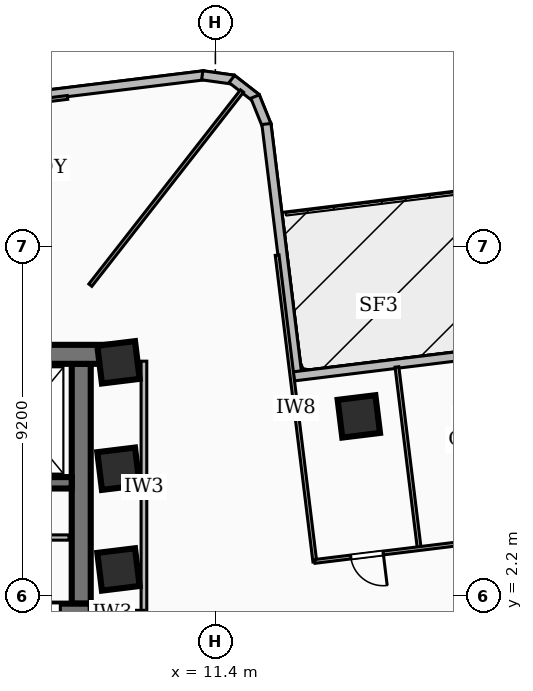
"""IFC4 building model, lengths in metres.
Left out: names, types, materials, properties, quantities, classifications, styles, units other than length and angle.
Written with IfcOpenShell. Run it as: python <this file> out.ifc"""

import sys

from ifc_helpers import new_model, si_unit, direction, frame, frame_2d, origin, origin_2d, place, context, subcontext, project, spatial, rectangle, extrude, element, fill, save


model = new_model("IFC4")
c1 = context("Model", 3, precision=1e-05, world=origin(), true_north=direction((0.0, 1.0)))
c2 = subcontext(c1, "Body", "Model", "MODEL_VIEW")
j1 = project(units=[si_unit("LENGTHUNIT", "METRE"), si_unit("PLANEANGLEUNIT", "RADIAN")], contexts=[c1])
p1 = place(None, origin())
s1 = spatial("IfcSite", under=j1, at=p1, CompositionType="ELEMENT")
p2 = place(p1, origin())
s2 = spatial("IfcBuilding", under=s1, at=p2, CompositionType="ELEMENT")
p3 = place(p2, frame((0.0, 0.0, 78.48)))
s3 = spatial("IfcBuildingStorey", under=s2, at=p3, CompositionType="ELEMENT", Elevation=78.48)
p4 = place(p3, frame((-8.78, 8.56, 0.0), z_axis=(0.0, 0.0, 1.0), x_axis=(1.0, 0.0, 0.0)))
e1 = element("IfcWall", 1, at=p4, inside=s3, PredefinedType="SHEAR", context=c2, shape_type="SweptSolid", body=[
    extrude(rectangle(XDim=17.56, YDim=0.5, at=frame_2d((8.78, 0.0))), origin(), (0.0, 0.0, 1.0), 3.34),
])
p5 = place(p3, frame((8.12, 1.75, 0.0), z_axis=(0.0, 0.0, 1.0), x_axis=(-1.0, 0.0, 0.0)))
e2 = element("IfcWall", 2, at=p5, inside=s3, PredefinedType="SHEAR", context=c2, shape_type="SweptSolid", body=[
    extrude(rectangle(XDim=16.24, YDim=0.5, at=frame_2d((8.12, 0.0))), origin(), (0.0, 0.0, 1.0), 3.34),
])
p6 = place(p5, frame((7.45, 0.0, 0.0)))
e3 = element("IfcOpeningElement", 3, at=p6, cuts=e2, PredefinedType="OPENING", context=c2, shape_type="SweptSolid", body=[
    extrude(rectangle(XDim=1.0, YDim=2.1, at=frame_2d((0.5, 1.05))), frame((0.0, 0.26, 0.0), z_axis=(0.0, -1.0, 0.0), x_axis=(1.0, 0.0, 0.0)), (0.0, 0.0, 1.0), 0.52),
])
p7 = place(p5, frame((3.85, 0.0, 0.0)))
e4 = element("IfcOpeningElement", 4, at=p7, cuts=e2, PredefinedType="OPENING", context=c2, shape_type="SweptSolid", body=[
    extrude(rectangle(XDim=0.9, YDim=2.06, at=frame_2d((0.45, 1.03))), frame((0.0, 0.26, 0.0), z_axis=(0.0, -1.0, 0.0), x_axis=(1.0, 0.0, 0.0)), (0.0, 0.0, 1.0), 0.52),
])
p8 = place(p5, frame((2.35, 0.0, 0.0)))
e5 = element("IfcOpeningElement", 5, at=p8, cuts=e2, PredefinedType="OPENING", context=c2, shape_type="SweptSolid", body=[
    extrude(rectangle(XDim=0.9, YDim=2.06, at=frame_2d((0.45, 1.03))), frame((0.0, 0.26, 0.0), z_axis=(0.0, -1.0, 0.0), x_axis=(1.0, 0.0, 0.0)), (0.0, 0.0, 1.0), 0.52),
])
p9 = place(p5, frame((0.8, 0.0, 0.0)))
e6 = element("IfcOpeningElement", 6, at=p9, cuts=e2, PredefinedType="OPENING", context=c2, shape_type="SweptSolid", body=[
    extrude(rectangle(XDim=0.9, YDim=2.06, at=frame_2d((0.45, 1.03))), frame((0.0, 0.26, 0.0), z_axis=(0.0, -1.0, 0.0), x_axis=(1.0, 0.0, 0.0)), (0.0, 0.0, 1.0), 0.52),
])
p10 = place(p3, frame((7.87, 8.31, 0.0), z_axis=(0.0, 0.0, 1.0), x_axis=(0.0, -1.0, 0.0)))
e7 = element("IfcWall", 7, at=p10, inside=s3, PredefinedType="SHEAR", context=c2, shape_type="SweptSolid", body=[
    extrude(rectangle(XDim=6.31, YDim=0.5, at=frame_2d((3.155, 0.0))), origin(), (0.0, 0.0, 1.0), 3.34),
])
p11 = place(p3, frame((7.62, 5.18, 0.0), z_axis=(0.0, 0.0, 1.0), x_axis=(-1.0, 0.0, 0.0)))
e8 = element("IfcWall", 8, at=p11, inside=s3, PredefinedType="SOLIDWALL", context=c2, shape_type="SweptSolid", body=[
    extrude(rectangle(XDim=15.24, YDim=0.3, at=frame_2d((7.62, 0.0))), origin(), (0.0, 0.0, 1.0), 3.34),
])
p12 = place(p11, frame((5.77, 0.0, 0.0)))
e9 = element("IfcOpeningElement", 9, at=p12, cuts=e8, PredefinedType="OPENING", context=c2, shape_type="SweptSolid", body=[
    extrude(rectangle(XDim=1.1, YDim=2.15, at=frame_2d((0.55, 1.075))), frame((0.0, 0.16, 0.0), z_axis=(0.0, -1.0, 0.0), x_axis=(1.0, 0.0, 0.0)), (0.0, 0.0, 1.0), 0.32),
])
p13 = place(p11, frame((2.97, 0.0, 0.0)))
e10 = element("IfcOpeningElement", 10, at=p13, cuts=e8, PredefinedType="OPENING", context=c2, shape_type="SweptSolid", body=[
    extrude(rectangle(XDim=1.1, YDim=2.15, at=frame_2d((0.55, 1.075))), frame((0.0, 0.16, 0.0), z_axis=(0.0, -1.0, 0.0), x_axis=(1.0, 0.0, 0.0)), (0.0, 0.0, 1.0), 0.32),
])
p14 = place(p11, frame((7.97, 0.0, 0.0)))
e11 = element("IfcOpeningElement", 11, at=p14, cuts=e8, PredefinedType="OPENING", context=c2, shape_type="SweptSolid", body=[
    extrude(rectangle(XDim=1.0, YDim=2.1, at=frame_2d((0.5, 1.05))), frame((0.0, 0.16, 0.0), z_axis=(0.0, -1.0, 0.0), x_axis=(1.0, 0.0, 0.0)), (0.0, 0.0, 1.0), 0.32),
])
for number, where, z_axis, x_axis in (
    (12, (8.85, 2.9, 0.0), (0.0, 0.0, 1.0), (0.993, 0.122, 0.0)),
    (13, (8.85, 5.55, 0.0), (0.0, 0.0, 1.0), (0.993, 0.122, 0.0)),
    (14, (8.85, 8.35, 0.0), (0.0, 0.0, 1.0), (0.993, 0.122, 0.0)),
    (15, (15.175, 6.927, 0.0), (0.0, 0.0, 1.0), (0.993, 0.122, 0.0)),
):
    element("IfcColumn", number, at=place(p3, frame(where, z_axis=z_axis, x_axis=x_axis)), inside=s3, PredefinedType="COLUMN", context=c2, shape_type="SweptSolid", body=[
        extrude(rectangle(XDim=1.0, YDim=1.0, at=origin_2d()), origin(), (0.0, 0.0, 1.0), 3.6),
    ])
p15 = place(p3, frame((4.558, 15.098, 0.0), z_axis=(0.0, 0.0, 1.0), x_axis=(0.992537639855, 0.121938646341, 0.0)))
e16 = element("IfcWall", 16, at=p15, inside=s3, PredefinedType="SOLIDWALL", context=c2, shape_type="SweptSolid", body=[
    extrude(rectangle(XDim=6.595, YDim=0.24, at=frame_2d((3.298, 0.0))), origin(), (0.0, 0.0, 1.0), 2.486),
])
p16 = place(p3, frame((11.054, 15.902, 0.0), z_axis=(0.0, 0.0, 1.0), x_axis=(0.990379629694, -0.138376981782, 0.0)))
e17 = element("IfcWall", 17, at=p16, inside=s3, PredefinedType="SOLIDWALL", context=c2, shape_type="SweptSolid", body=[
    extrude(rectangle(XDim=0.831, YDim=0.24, at=frame_2d((0.416, 0.0))), origin(), (0.0, 0.0, 1.0), 3.34),
])
p17 = place(p3, frame((11.832, 15.805, 0.0), z_axis=(0.0, 0.0, 1.0), x_axis=(0.788996702001, -0.614397431824, 0.0)))
e18 = element("IfcWall", 18, at=p17, inside=s3, PredefinedType="SOLIDWALL", context=c2, shape_type="SweptSolid", body=[
    extrude(rectangle(XDim=0.814, YDim=0.24, at=frame_2d((0.407, 0.0))), origin(), (0.0, 0.0, 1.0), 3.34),
])
p18 = place(p3, frame((12.445, 15.343, 0.0), z_axis=(0.0, 0.0, 1.0), x_axis=(0.37326634174, -0.927724225254, 0.0)))
e19 = element("IfcWall", 19, at=p18, inside=s3, PredefinedType="SOLIDWALL", context=c2, shape_type="SweptSolid", body=[
    extrude(rectangle(XDim=0.83, YDim=0.24, at=frame_2d((0.415, 0.0))), origin(), (0.0, 0.0, 1.0), 3.34),
])
p19 = place(p3, frame((12.743, 14.621, 0.0), z_axis=(0.0, 0.0, 1.0), x_axis=(0.121949848087, -0.992536263595, 0.0)))
e20 = element("IfcWall", 20, at=p19, inside=s3, PredefinedType="SOLIDWALL", context=c2, shape_type="SweptSolid", body=[
    extrude(rectangle(XDim=6.775, YDim=0.24, at=frame_2d((3.387, 0.0))), origin(), (0.0, 0.0, 1.0), 2.644),
])
p20 = place(p3, frame((13.462, 7.98, 0.0), z_axis=(0.0, 0.0, 1.0), x_axis=(0.992550299081, 0.121835560463, 0.0)))
e21 = element("IfcWall", 21, at=p20, inside=s3, PredefinedType="SOLIDWALL", context=c2, shape_type="SweptSolid", body=[
    extrude(rectangle(XDim=16.275, YDim=0.24, at=frame_2d((8.138, 0.0))), origin(), (0.0, 0.0, 1.0), 2.644),
])
p21 = place(p20, frame((4.4, 0.0, 0.0)))
e22 = element("IfcOpeningElement", 22, at=p21, cuts=e21, PredefinedType="OPENING", context=c2, shape_type="SweptSolid", body=[
    extrude(rectangle(XDim=1.1, YDim=2.1, at=frame_2d((0.55, 1.05))), frame((0.0, 0.13, 0.0), z_axis=(0.0, -1.0, 0.0), x_axis=(1.0, 0.0, 0.0)), (0.0, 0.0, 1.0), 0.26),
])
p22 = place(p3, frame((2.9, 3.74, 0.0), z_axis=(0.0, 0.0, 1.0), x_axis=(1.0, 0.0, 0.0)))
e23 = element("IfcWall", 23, at=p22, inside=s3, PredefinedType="PARTITIONING", context=c2, shape_type="SweptSolid", body=[
    extrude(rectangle(XDim=4.65, YDim=0.138, at=frame_2d((2.325, 0.0))), origin(), (0.0, 0.0, 1.0), 3.34),
])
p23 = place(p3, frame((9.52, 1.75, 0.0), z_axis=(0.0, 0.0, 1.0), x_axis=(0.0, 1.0, 0.0)))
e24 = element("IfcWall", 24, at=p23, inside=s3, PredefinedType="PARTITIONING", context=c2, shape_type="SweptSolid", body=[
    extrude(rectangle(XDim=6.63, YDim=0.15, at=frame_2d((3.315, 0.0))), origin(), (0.0, 0.0, 1.0), 2.486),
])
p24 = place(p3, frame((7.85, 1.75, 0.0), z_axis=(0.0, 0.0, 1.0), x_axis=(1.0, 0.0, 0.0)))
e25 = element("IfcWall", 25, at=p24, inside=s3, PredefinedType="PARTITIONING", context=c2, shape_type="SweptSolid", body=[
    extrude(rectangle(XDim=1.67, YDim=0.15, at=frame_2d((0.835, 0.0))), origin(), (0.0, 0.0, 1.0), 2.405),
])
p25 = place(p3, frame((8.11, 10.38, 0.0), z_axis=(0.0, 0.0, 1.0), x_axis=(0.615665236773, 0.788007814828, 0.0)))
e26 = element("IfcWall", 26, at=p25, inside=s3, PredefinedType="PARTITIONING", context=c2, shape_type="SweptSolid", body=[
    extrude(rectangle(XDim=6.482, YDim=0.1, at=frame_2d((3.241, 0.0))), origin(), (0.0, 0.0, 1.0), 2.644),
])
p26 = place(p3, frame((14.017, 3.101, 0.0), z_axis=(0.0, 0.0, 1.0), x_axis=(-0.122045971517, 0.992524448483, 0.0)))
e27 = element("IfcWall", 27, at=p26, inside=s3, PredefinedType="PARTITIONING", context=c2, shape_type="SweptSolid", body=[
    extrude(rectangle(XDim=8.13, YDim=0.1, at=frame_2d((4.065, 0.0))), origin(), (0.0, 0.0, 1.0), 2.486),
])
p27 = place(p3, frame((16.762, 3.469, 0.0), z_axis=(0.0, 0.0, 1.0), x_axis=(-0.121797137196, 0.992555014783, 0.0)))
e28 = element("IfcWall", 28, at=p27, inside=s3, PredefinedType="PARTITIONING", context=c2, shape_type="SweptSolid", body=[
    extrude(rectangle(XDim=4.795, YDim=0.1, at=frame_2d((2.397, 0.0))), origin(), (0.0, 0.0, 1.0), 2.486),
])
p28 = place(p3, frame((21.866, 4.075, 0.0), z_axis=(0.0, 0.0, 1.0), x_axis=(-0.992548040298, -0.121853960542, 0.0)))
e29 = element("IfcWall", 29, at=p28, inside=s3, PredefinedType="PARTITIONING", context=c2, shape_type="SweptSolid", body=[
    extrude(rectangle(XDim=7.91, YDim=0.1, at=frame_2d((3.955, 0.0))), origin(), (0.0, 0.0, 1.0), 3.34),
])
p29 = place(p28, frame((6.095, 0.0, 0.0)))
e30 = element("IfcOpeningElement", 30, at=p29, cuts=e29, PredefinedType="OPENING", context=c2, shape_type="SweptSolid", body=[
    extrude(rectangle(XDim=0.86, YDim=2.04, at=frame_2d((0.43, 1.02))), frame((0.0, 0.06, 0.0), z_axis=(0.0, -1.0, 0.0), x_axis=(1.0, 0.0, 0.0)), (0.0, 0.0, 1.0), 0.12),
])
p30 = place(p28, frame((2.14, 0.0, 0.0)))
e31 = element("IfcOpeningElement", 31, at=p30, cuts=e29, PredefinedType="OPENING", context=c2, shape_type="SweptSolid", body=[
    extrude(rectangle(XDim=0.86, YDim=2.04, at=frame_2d((0.43, 1.02))), frame((0.0, 0.06, 0.0), z_axis=(0.0, -1.0, 0.0), x_axis=(1.0, 0.0, 0.0)), (0.0, 0.0, 1.0), 0.12),
])
p31 = place(p3, frame((7.509, 15.32, 0.0), z_axis=(0.0, 0.0, 1.0), x_axis=(-0.992529957607, -0.122001160868, 0.0)))
e32 = element("IfcWall", 32, at=p31, inside=s3, PredefinedType="PARTITIONING", context=c2, shape_type="SweptSolid", body=[
    extrude(rectangle(XDim=7.95, YDim=0.1, at=frame_2d((3.975, 0.0))), origin(), (0.0, 0.0, 1.0), 2.486),
])
p32 = place(p29, origin())
e33 = element("IfcDoor", 33, at=p32, inside=s3, OperationType="SINGLE_SWING_LEFT", PredefinedType="DOOR", context=c2, shape_type="SweptSolid", body=[
    extrude(rectangle(XDim=0.86, YDim=2.04, at=frame_2d((0.43, 1.02))), frame((0.0, 0.025, 0.0), z_axis=(0.0, -1.0, 0.0), x_axis=(1.0, 0.0, 0.0)), (0.0, 0.0, 1.0), 0.05),
])
fill(e30, e33)
save(model, sys.argv[1])
